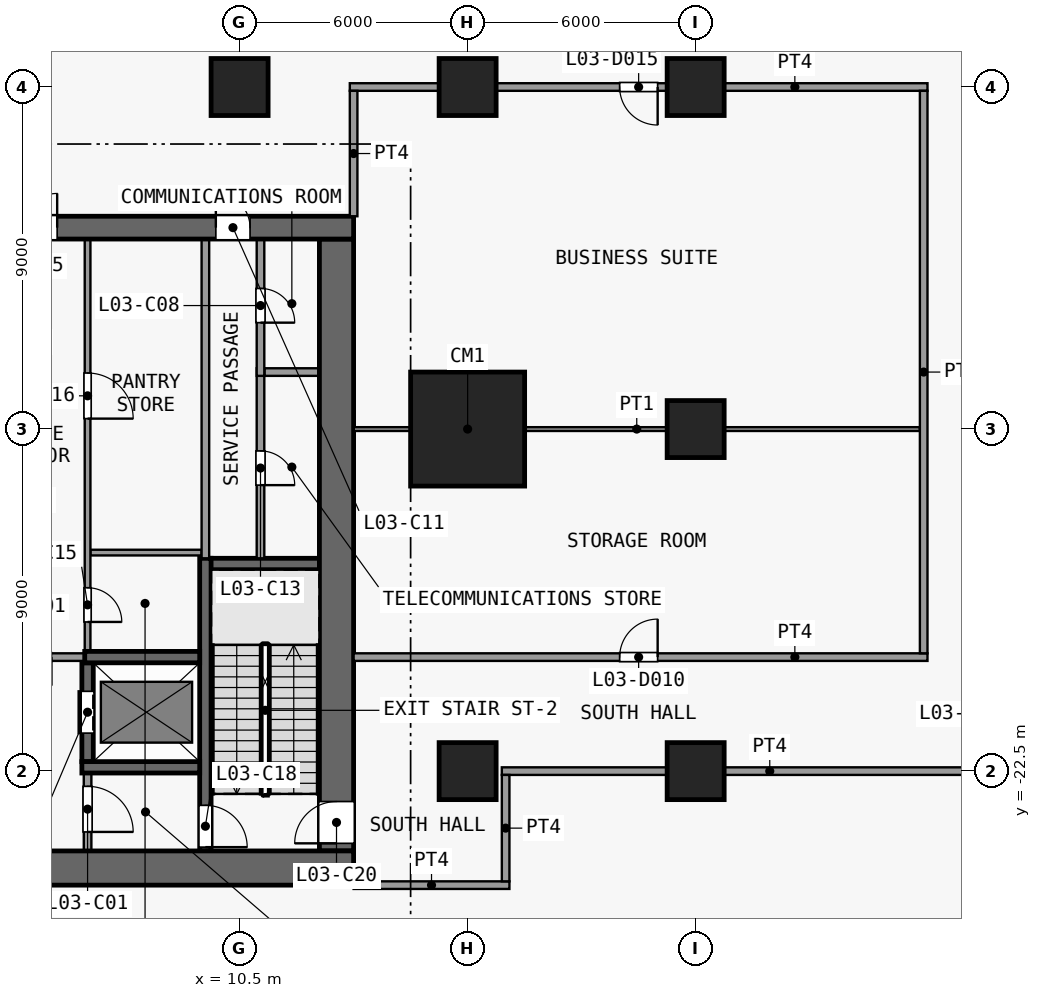
"""IFC4 building model, lengths in metres.
Left out: names, types, materials, properties, quantities, classifications, styles, units other than length and angle.
Written with IfcOpenShell. Run it as: python <this file> out.ifc"""

import sys

from ifc_helpers import new_model, si_unit, direction, frame, frame_2d, origin, origin_2d, place, context, subcontext, project, spatial, rectangle, extrude, element, fill, save


model = new_model("IFC4")
c1 = context("Model", 3, precision=1e-05, world=origin(), true_north=direction((0.0, 1.0)))
c2 = subcontext(c1, "Body", "Model", "MODEL_VIEW")
j1 = project(units=[si_unit("LENGTHUNIT", "METRE"), si_unit("PLANEANGLEUNIT", "RADIAN")], contexts=[c1])
p1 = place(None, origin())
s1 = spatial("IfcSite", under=j1, at=p1, CompositionType="ELEMENT")
p2 = place(p1, origin())
s2 = spatial("IfcBuilding", under=s1, at=p2, CompositionType="ELEMENT")
p3 = place(p2, frame((0.0, 0.0, 18.5)))
s3 = spatial("IfcBuildingStorey", under=s2, at=p3, CompositionType="ELEMENT", Elevation=18.5)
for number, where, z_axis, x_axis in (
    (1, (10.5, -4.5, 0.0), (0.0, 0.0, 1.0), (1.0, 0.0, 0.0)),
    (2, (16.5, -22.5, 0.0), (0.0, 0.0, 1.0), (1.0, 0.0, 0.0)),
):
    element("IfcColumn", number, at=place(p3, frame(where, z_axis=z_axis, x_axis=x_axis)), inside=s3, PredefinedType="COLUMN", context=c2, shape_type="SweptSolid", body=[
        extrude(rectangle(XDim=1.5, YDim=1.5, at=origin_2d()), origin(), (0.0, 0.0, 1.0), 5.0),
    ])
p4 = place(p3, frame((16.5, -13.5, 0.0), z_axis=(0.0, 0.0, 1.0), x_axis=(1.0, 0.0, 0.0)))
e3 = element("IfcColumn", 3, at=p4, inside=s3, PredefinedType="COLUMN", context=c2, shape_type="SweptSolid", body=[
    extrude(rectangle(XDim=3.0, YDim=3.0, at=origin_2d()), origin(), (0.0, 0.0, 1.0), 5.0),
])
for number, where, z_axis, x_axis in (
    (4, (16.5, -4.5, 0.0), (0.0, 0.0, 1.0), (1.0, 0.0, 0.0)),
    (5, (22.5, -22.5, 0.0), (0.0, 0.0, 1.0), (1.0, 0.0, 0.0)),
    (6, (22.5, -13.5, 0.0), (0.0, 0.0, 1.0), (1.0, 0.0, 0.0)),
    (7, (22.5, -4.5, 0.0), (0.0, 0.0, 1.0), (1.0, 0.0, 0.0)),
):
    element("IfcColumn", number, at=place(p3, frame(where, z_axis=z_axis, x_axis=x_axis)), inside=s3, PredefinedType="COLUMN", context=c2, shape_type="SweptSolid", body=[
        extrude(rectangle(XDim=1.5, YDim=1.5, at=origin_2d()), origin(), (0.0, 0.0, 1.0), 5.0),
    ])
p5 = place(p3, frame((-13.5, -25.05, 0.0), z_axis=(0.0, 0.0, 1.0), x_axis=(1.0, 0.0, 0.0)))
e8 = element("IfcWall", 8, at=p5, inside=s3, PredefinedType="SHEAR", context=c2, shape_type="SweptSolid", body=[
    extrude(rectangle(XDim=27.0, YDim=0.9, at=frame_2d((13.5, 0.0))), origin(), (0.0, 0.0, 1.0), 4.65),
])
p6 = place(p3, frame((-13.5, -8.2, 0.0), z_axis=(0.0, 0.0, 1.0), x_axis=(1.0, 0.0, 0.0)))
e9 = element("IfcWall", 9, at=p6, inside=s3, PredefinedType="SHEAR", context=c2, shape_type="SweptSolid", body=[
    extrude(rectangle(XDim=27.0, YDim=0.6, at=frame_2d((13.5, 0.0))), origin(), (0.0, 0.0, 1.0), 4.65),
])
p7 = place(p6, frame((7.8, 0.0, 0.0)))
e10 = element("IfcOpeningElement", 10, at=p7, cuts=e9, PredefinedType="OPENING", context=c2, shape_type="SweptSolid", body=[
    extrude(rectangle(XDim=1.8, YDim=2.1, at=frame_2d((0.9, 1.05))), frame((0.0, 0.31, 0.0), z_axis=(0.0, -1.0, 0.0), x_axis=(1.0, 0.0, 0.0)), (0.0, 0.0, 1.0), 0.62),
])
p8 = place(p6, frame((17.4, 0.0, 0.0)))
e11 = element("IfcOpeningElement", 11, at=p8, cuts=e9, PredefinedType="OPENING", context=c2, shape_type="SweptSolid", body=[
    extrude(rectangle(XDim=1.8, YDim=2.1, at=frame_2d((0.9, 1.05))), frame((0.0, 0.31, 0.0), z_axis=(0.0, -1.0, 0.0), x_axis=(1.0, 0.0, 0.0)), (0.0, 0.0, 1.0), 0.62),
])
p9 = place(p6, frame((2.725, 0.0, 0.0)))
e12 = element("IfcOpeningElement", 12, at=p9, cuts=e9, PredefinedType="OPENING", context=c2, shape_type="SweptSolid", body=[
    extrude(rectangle(XDim=0.9, YDim=2.1, at=frame_2d((0.45, 1.05))), frame((0.0, 0.31, 0.0), z_axis=(0.0, -1.0, 0.0), x_axis=(1.0, 0.0, 0.0)), (0.0, 0.0, 1.0), 0.62),
])
p10 = place(p6, frame((23.375, 0.0, 0.0)))
e13 = element("IfcOpeningElement", 13, at=p10, cuts=e9, PredefinedType="OPENING", context=c2, shape_type="SweptSolid", body=[
    extrude(rectangle(XDim=0.9, YDim=2.1, at=frame_2d((0.45, 1.05))), frame((0.0, 0.31, 0.0), z_axis=(0.0, -1.0, 0.0), x_axis=(1.0, 0.0, 0.0)), (0.0, 0.0, 1.0), 0.62),
])
p11 = place(p3, frame((13.05, -24.6, 0.0), z_axis=(0.0, 0.0, 1.0), x_axis=(0.0, 1.0, 0.0)))
e14 = element("IfcWall", 14, at=p11, inside=s3, PredefinedType="SHEAR", context=c2, shape_type="SweptSolid", body=[
    extrude(rectangle(XDim=16.1, YDim=0.9, at=frame_2d((8.05, 0.0))), origin(), (0.0, 0.0, 1.0), 4.65),
])
p12 = place(p11, frame((0.2, 0.0, 0.0)))
e15 = element("IfcOpeningElement", 15, at=p12, cuts=e14, PredefinedType="OPENING", context=c2, shape_type="SweptSolid", body=[
    extrude(rectangle(XDim=1.1, YDim=2.1, at=frame_2d((0.55, 1.05))), frame((0.0, 0.46, 0.0), z_axis=(0.0, -1.0, 0.0), x_axis=(1.0, 0.0, 0.0)), (0.0, 0.0, 1.0), 0.92),
])
p13 = place(p3, frame((6.35, -22.4, 0.0), z_axis=(0.0, 0.0, 1.0), x_axis=(1.0, 0.0, 0.0)))
e16 = element("IfcWall", 16, at=p13, inside=s3, PredefinedType="SHEAR", context=c2, shape_type="SweptSolid", body=[
    extrude(rectangle(XDim=3.1, YDim=0.3, at=frame_2d((1.55, 0.0))), origin(), (0.0, 0.0, 1.0), 4.65),
])
p14 = place(p3, frame((6.575, -19.5, 0.0), z_axis=(0.0, 0.0, 1.0), x_axis=(-1.0, 0.0, 0.0)))
e17 = element("IfcWall", 17, at=p14, inside=s3, PredefinedType="PARTITIONING", context=c2, shape_type="SweptSolid", body=[
    extrude(rectangle(XDim=3.375, YDim=0.2, at=frame_2d((1.688, 0.0))), origin(), (0.0, 0.0, 1.0), 4.65),
])
p15 = place(p14, frame((1.025, 0.0, 0.0)))
e18 = element("IfcOpeningElement", 18, at=p15, cuts=e17, PredefinedType="OPENING", context=c2, shape_type="SweptSolid", body=[
    extrude(rectangle(XDim=1.5, YDim=2.1, at=frame_2d((0.75, 1.05))), frame((0.0, 0.11, 0.0), z_axis=(0.0, -1.0, 0.0), x_axis=(1.0, 0.0, 0.0)), (0.0, 0.0, 1.0), 0.22),
])
p16 = place(p3, frame((6.425, -19.5, 0.0), z_axis=(0.0, 0.0, 1.0), x_axis=(1.0, 0.0, 0.0)))
e19 = element("IfcWall", 19, at=p16, inside=s3, PredefinedType="SHEAR", context=c2, shape_type="SweptSolid", body=[
    extrude(rectangle(XDim=3.025, YDim=0.3, at=frame_2d((1.512, 0.0))), origin(), (0.0, 0.0, 1.0), 4.65),
])
p17 = place(p3, frame((9.5, -17.05, 0.0), z_axis=(0.0, 0.0, 1.0), x_axis=(1.0, 0.0, 0.0)))
e20 = element("IfcWall", 20, at=p17, inside=s3, PredefinedType="SHEAR", context=c2, shape_type="SweptSolid", body=[
    extrude(rectangle(XDim=3.1, YDim=0.3, at=frame_2d((1.55, 0.0))), origin(), (0.0, 0.0, 1.0), 4.65),
])
p18 = place(p3, frame((6.575, -16.75, 0.0), z_axis=(0.0, 0.0, 1.0), x_axis=(1.0, 0.0, 0.0)))
e21 = element("IfcWall", 21, at=p18, inside=s3, PredefinedType="PARTITIONING", context=c2, shape_type="SweptSolid", body=[
    extrude(rectangle(XDim=2.925, YDim=0.15, at=frame_2d((1.462, 0.0))), origin(), (0.0, 0.0, 1.0), 4.65),
])
p19 = place(p3, frame((11.15, -12.0, 0.0), z_axis=(0.0, 0.0, 1.0), x_axis=(1.0, 0.0, 0.0)))
e22 = element("IfcWall", 22, at=p19, inside=s3, PredefinedType="PARTITIONING", context=c2, shape_type="SweptSolid", body=[
    extrude(rectangle(XDim=1.45, YDim=0.2, at=frame_2d((0.725, 0.0))), origin(), (0.0, 0.0, 1.0), 4.65),
])
p20 = place(p3, frame((6.5, -22.55, 0.0), z_axis=(0.0, 0.0, 1.0), x_axis=(0.0, -1.0, 0.0)))
e23 = element("IfcWall", 23, at=p20, inside=s3, PredefinedType="PARTITIONING", context=c2, shape_type="SweptSolid", body=[
    extrude(rectangle(XDim=2.05, YDim=0.2, at=frame_2d((1.025, 0.0))), origin(), (0.0, 0.0, 1.0), 4.65),
])
p21 = place(p20, frame((0.35, 0.0, 0.0)))
e24 = element("IfcOpeningElement", 24, at=p21, cuts=e23, PredefinedType="OPENING", context=c2, shape_type="SweptSolid", body=[
    extrude(rectangle(XDim=1.2, YDim=2.1, at=frame_2d((0.6, 1.05))), frame((0.0, 0.11, 0.0), z_axis=(0.0, -1.0, 0.0), x_axis=(1.0, 0.0, 0.0)), (0.0, 0.0, 1.0), 0.22),
])
p22 = place(p3, frame((6.5, -22.25, 0.0), z_axis=(0.0, 0.0, 1.0), x_axis=(0.0, 1.0, 0.0)))
e25 = element("IfcWall", 25, at=p22, inside=s3, PredefinedType="SHEAR", context=c2, shape_type="SweptSolid", body=[
    extrude(rectangle(XDim=2.6, YDim=0.3, at=frame_2d((1.3, 0.0))), origin(), (0.0, 0.0, 1.0), 4.65),
])
p23 = place(p22, frame((0.75, 0.0, 0.0)))
e26 = element("IfcOpeningElement", 26, at=p23, cuts=e25, PredefinedType="OPENING", context=c2, shape_type="SweptSolid", body=[
    extrude(rectangle(XDim=1.1, YDim=2.1, at=frame_2d((0.55, 1.05))), frame((0.0, 0.16, 0.0), z_axis=(0.0, -1.0, 0.0), x_axis=(1.0, 0.0, 0.0)), (0.0, 0.0, 1.0), 0.32),
])
p24 = place(p3, frame((6.5, -8.5, 0.0), z_axis=(0.0, 0.0, 1.0), x_axis=(0.0, -1.0, 0.0)))
e27 = element("IfcWall", 27, at=p24, inside=s3, PredefinedType="PARTITIONING", context=c2, shape_type="SweptSolid", body=[
    extrude(rectangle(XDim=10.85, YDim=0.15, at=frame_2d((5.425, 0.0))), origin(), (0.0, 0.0, 1.0), 4.65),
])
p25 = place(p24, frame((9.175, 0.0, 0.0)))
e28 = element("IfcOpeningElement", 28, at=p25, cuts=e27, PredefinedType="OPENING", context=c2, shape_type="SweptSolid", body=[
    extrude(rectangle(XDim=0.9, YDim=2.1, at=frame_2d((0.45, 1.05))), frame((0.0, 0.085, 0.0), z_axis=(0.0, -1.0, 0.0), x_axis=(1.0, 0.0, 0.0)), (0.0, 0.0, 1.0), 0.17),
])
p26 = place(p24, frame((3.525, 0.0, 0.0)))
e29 = element("IfcOpeningElement", 29, at=p26, cuts=e27, PredefinedType="OPENING", context=c2, shape_type="SweptSolid", body=[
    extrude(rectangle(XDim=1.2, YDim=2.1, at=frame_2d((0.6, 1.05))), frame((0.0, 0.085, 0.0), z_axis=(0.0, -1.0, 0.0), x_axis=(1.0, 0.0, 0.0)), (0.0, 0.0, 1.0), 0.17),
])
p27 = place(p3, frame((9.6, -16.9, 0.0), z_axis=(0.0, 0.0, 1.0), x_axis=(0.0, -1.0, 0.0)))
e30 = element("IfcWall", 30, at=p27, inside=s3, PredefinedType="SHEAR", context=c2, shape_type="SweptSolid", body=[
    extrude(rectangle(XDim=7.7, YDim=0.3, at=frame_2d((3.85, 0.0))), origin(), (0.0, 0.0, 1.0), 4.65),
])
p28 = place(p27, frame((6.5, 0.0, 0.0)))
e31 = element("IfcOpeningElement", 31, at=p28, cuts=e30, PredefinedType="OPENING", context=c2, shape_type="SweptSolid", body=[
    extrude(rectangle(XDim=1.1, YDim=2.1, at=frame_2d((0.55, 1.05))), frame((0.0, 0.16, 0.0), z_axis=(0.0, -1.0, 0.0), x_axis=(1.0, 0.0, 0.0)), (0.0, 0.0, 1.0), 0.32),
])
p29 = place(p3, frame((9.6, -16.9, 0.0), z_axis=(0.0, 0.0, 1.0), x_axis=(0.0, 1.0, 0.0)))
e32 = element("IfcWall", 32, at=p29, inside=s3, PredefinedType="PARTITIONING", context=c2, shape_type="SweptSolid", body=[
    extrude(rectangle(XDim=8.4, YDim=0.2, at=frame_2d((4.2, 0.0))), origin(), (0.0, 0.0, 1.0), 4.65),
])
p30 = place(p3, frame((11.05, -11.9, 0.0), z_axis=(0.0, 0.0, 1.0), x_axis=(0.0, -1.0, 0.0)))
e33 = element("IfcWall", 33, at=p30, inside=s3, PredefinedType="PARTITIONING", context=c2, shape_type="SweptSolid", body=[
    extrude(rectangle(XDim=5.0, YDim=0.2, at=frame_2d((2.5, 0.0))), origin(), (0.0, 0.0, 1.0), 4.65),
])
p31 = place(p30, frame((2.175, 0.0, 0.0)))
e34 = element("IfcOpeningElement", 34, at=p31, cuts=e33, PredefinedType="OPENING", context=c2, shape_type="SweptSolid", body=[
    extrude(rectangle(XDim=0.9, YDim=2.1, at=frame_2d((0.45, 1.05))), frame((0.0, 0.11, 0.0), z_axis=(0.0, -1.0, 0.0), x_axis=(1.0, 0.0, 0.0)), (0.0, 0.0, 1.0), 0.22),
])
p32 = place(p3, frame((11.05, -8.5, 0.0), z_axis=(0.0, 0.0, 1.0), x_axis=(0.0, -1.0, 0.0)))
e35 = element("IfcWall", 35, at=p32, inside=s3, PredefinedType="PARTITIONING", context=c2, shape_type="SweptSolid", body=[
    extrude(rectangle(XDim=3.6, YDim=0.2, at=frame_2d((1.8, 0.0))), origin(), (0.0, 0.0, 1.0), 4.65),
])
p33 = place(p32, frame((1.3, 0.0, 0.0)))
e36 = element("IfcOpeningElement", 36, at=p33, cuts=e35, PredefinedType="OPENING", context=c2, shape_type="SweptSolid", body=[
    extrude(rectangle(XDim=0.9, YDim=2.1, at=frame_2d((0.45, 1.05))), frame((0.0, 0.11, 0.0), z_axis=(0.0, -1.0, 0.0), x_axis=(1.0, 0.0, 0.0)), (0.0, 0.0, 1.0), 0.22),
])
p34 = place(p3, frame((13.5, -25.5, 0.0), z_axis=(0.0, 0.0, 1.0), x_axis=(1.0, 0.0, 0.0)))
e37 = element("IfcWall", 37, at=p34, inside=s3, PredefinedType="PARTITIONING", context=c2, shape_type="SweptSolid", body=[
    extrude(rectangle(XDim=4.1, YDim=0.2, at=frame_2d((2.05, 0.0))), origin(), (0.0, 0.0, 1.0), 4.65),
])
p35 = place(p3, frame((17.4, -22.5, 0.0), z_axis=(0.0, 0.0, 1.0), x_axis=(1.0, 0.0, 0.0)))
e38 = element("IfcWall", 38, at=p35, inside=s3, PredefinedType="PARTITIONING", context=c2, shape_type="SweptSolid", body=[
    extrude(rectangle(XDim=14.1, YDim=0.2, at=frame_2d((7.05, 0.0))), origin(), (0.0, 0.0, 1.0), 4.65),
])
p36 = place(p3, frame((13.5, -19.5, 0.0), z_axis=(0.0, 0.0, 1.0), x_axis=(1.0, 0.0, 0.0)))
e39 = element("IfcWall", 39, at=p36, inside=s3, PredefinedType="PARTITIONING", context=c2, shape_type="SweptSolid", body=[
    extrude(rectangle(XDim=15.1, YDim=0.2, at=frame_2d((7.55, 0.0))), origin(), (0.0, 0.0, 1.0), 4.65),
])
p37 = place(p36, frame((7.0, 0.0, 0.0)))
e40 = element("IfcOpeningElement", 40, at=p37, cuts=e39, PredefinedType="OPENING", context=c2, shape_type="SweptSolid", body=[
    extrude(rectangle(XDim=1.0, YDim=2.1, at=frame_2d((0.5, 1.05))), frame((0.0, 0.11, 0.0), z_axis=(0.0, -1.0, 0.0), x_axis=(1.0, 0.0, 0.0)), (0.0, 0.0, 1.0), 0.22),
])
p38 = place(p3, frame((13.5, -13.5, 0.0), z_axis=(0.0, 0.0, 1.0), x_axis=(1.0, 0.0, 0.0)))
e41 = element("IfcWall", 41, at=p38, inside=s3, PredefinedType="PARTITIONING", context=c2, shape_type="SweptSolid", body=[
    extrude(rectangle(XDim=14.9, YDim=0.1, at=frame_2d((7.45, 0.0))), origin(), (0.0, 0.0, 1.0), 4.65),
])
p39 = place(p3, frame((13.4, -4.5, 0.0), z_axis=(0.0, 0.0, 1.0), x_axis=(1.0, 0.0, 0.0)))
e42 = element("IfcWall", 42, at=p39, inside=s3, PredefinedType="PARTITIONING", context=c2, shape_type="SweptSolid", body=[
    extrude(rectangle(XDim=15.2, YDim=0.2, at=frame_2d((7.6, 0.0))), origin(), (0.0, 0.0, 1.0), 4.65),
])
p40 = place(p39, frame((7.1, 0.0, 0.0)))
e43 = element("IfcOpeningElement", 43, at=p40, cuts=e42, PredefinedType="OPENING", context=c2, shape_type="SweptSolid", body=[
    extrude(rectangle(XDim=1.0, YDim=2.1, at=frame_2d((0.5, 1.05))), frame((0.0, 0.11, 0.0), z_axis=(0.0, -1.0, 0.0), x_axis=(1.0, 0.0, 0.0)), (0.0, 0.0, 1.0), 0.22),
])
p41 = place(p3, frame((13.5, -7.9, 0.0), z_axis=(0.0, 0.0, 1.0), x_axis=(0.0, 1.0, 0.0)))
e44 = element("IfcWall", 44, at=p41, inside=s3, PredefinedType="PARTITIONING", context=c2, shape_type="SweptSolid", body=[
    extrude(rectangle(XDim=3.3, YDim=0.2, at=frame_2d((1.65, 0.0))), origin(), (0.0, 0.0, 1.0), 4.65),
])
p42 = place(p3, frame((17.5, -25.4, 0.0), z_axis=(0.0, 0.0, 1.0), x_axis=(0.0, 1.0, 0.0)))
e45 = element("IfcWall", 45, at=p42, inside=s3, PredefinedType="PARTITIONING", context=c2, shape_type="SweptSolid", body=[
    extrude(rectangle(XDim=2.8, YDim=0.2, at=frame_2d((1.4, 0.0))), origin(), (0.0, 0.0, 1.0), 4.65),
])
p43 = place(p3, frame((28.5, -19.4, 0.0), z_axis=(0.0, 0.0, 1.0), x_axis=(0.0, 1.0, 0.0)))
e46 = element("IfcWall", 46, at=p43, inside=s3, PredefinedType="PARTITIONING", context=c2, shape_type="SweptSolid", body=[
    extrude(rectangle(XDim=14.8, YDim=0.2, at=frame_2d((7.4, 0.0))), origin(), (0.0, 0.0, 1.0), 4.65),
])
p44 = place(p23, origin())
e47 = element("IfcDoor", 47, at=p44, inside=s3, OperationType="DOUBLE_DOOR_SLIDING", PredefinedType="DOOR", context=c2, shape_type="SweptSolid", body=[
    extrude(rectangle(XDim=1.1, YDim=2.1, at=frame_2d((0.55, 1.05))), frame((0.0, 0.025, 0.0), z_axis=(0.0, -1.0, 0.0), x_axis=(1.0, 0.0, 0.0)), (0.0, 0.0, 1.0), 0.05),
])
fill(e26, e47)
p45 = place(p21, origin())
e48 = element("IfcDoor", 48, at=p45, inside=s3, OperationType="SINGLE_SWING_RIGHT", PredefinedType="DOOR", context=c2, shape_type="SweptSolid", body=[
    extrude(rectangle(XDim=1.2, YDim=2.1, at=frame_2d((0.6, 1.05))), frame((0.0, 0.025, 0.0), z_axis=(0.0, -1.0, 0.0), x_axis=(1.0, 0.0, 0.0)), (0.0, 0.0, 1.0), 0.05),
])
fill(e24, e48)
p46 = place(p8, origin())
e49 = element("IfcDoor", 49, at=p46, inside=s3, OperationType="DOUBLE_DOOR_SINGLE_SWING", PredefinedType="DOOR", context=c2, shape_type="SweptSolid", body=[
    extrude(rectangle(XDim=1.8, YDim=2.1, at=frame_2d((0.9, 1.05))), frame((0.0, 0.025, 0.0), z_axis=(0.0, -1.0, 0.0), x_axis=(1.0, 0.0, 0.0)), (0.0, 0.0, 1.0), 0.05),
])
fill(e11, e49)
p47 = place(p33, origin())
e50 = element("IfcDoor", 50, at=p47, inside=s3, OperationType="SINGLE_SWING_RIGHT", PredefinedType="DOOR", context=c2, shape_type="SweptSolid", body=[
    extrude(rectangle(XDim=0.9, YDim=2.1, at=frame_2d((0.45, 1.05))), frame((0.0, 0.025, 0.0), z_axis=(0.0, -1.0, 0.0), x_axis=(1.0, 0.0, 0.0)), (0.0, 0.0, 1.0), 0.05),
])
fill(e36, e50)
p48 = place(p10, origin())
e51 = element("IfcDoor", 51, at=p48, inside=s3, OperationType="SINGLE_SWING_LEFT", PredefinedType="DOOR", context=c2, shape_type="SweptSolid", body=[
    extrude(rectangle(XDim=0.9, YDim=2.1, at=frame_2d((0.45, 1.05))), frame((0.0, 0.025, 0.0), z_axis=(0.0, -1.0, 0.0), x_axis=(1.0, 0.0, 0.0)), (0.0, 0.0, 1.0), 0.05),
])
fill(e13, e51)
p49 = place(p31, origin())
e52 = element("IfcDoor", 52, at=p49, inside=s3, OperationType="SINGLE_SWING_RIGHT", PredefinedType="DOOR", context=c2, shape_type="SweptSolid", body=[
    extrude(rectangle(XDim=0.9, YDim=2.1, at=frame_2d((0.45, 1.05))), frame((0.0, 0.025, 0.0), z_axis=(0.0, -1.0, 0.0), x_axis=(1.0, 0.0, 0.0)), (0.0, 0.0, 1.0), 0.05),
])
fill(e34, e52)
p50 = place(p25, origin())
e53 = element("IfcDoor", 53, at=p50, inside=s3, OperationType="SINGLE_SWING_RIGHT", PredefinedType="DOOR", context=c2, shape_type="SweptSolid", body=[
    extrude(rectangle(XDim=0.9, YDim=2.1, at=frame_2d((0.45, 1.05))), frame((0.0, 0.025, 0.0), z_axis=(0.0, -1.0, 0.0), x_axis=(1.0, 0.0, 0.0)), (0.0, 0.0, 1.0), 0.05),
])
fill(e28, e53)
p51 = place(p26, origin())
e54 = element("IfcDoor", 54, at=p51, inside=s3, OperationType="SINGLE_SWING_RIGHT", PredefinedType="DOOR", context=c2, shape_type="SweptSolid", body=[
    extrude(rectangle(XDim=1.2, YDim=2.1, at=frame_2d((0.6, 1.05))), frame((0.0, 0.025, 0.0), z_axis=(0.0, -1.0, 0.0), x_axis=(1.0, 0.0, 0.0)), (0.0, 0.0, 1.0), 0.05),
])
fill(e29, e54)
p52 = place(p28, origin())
e55 = element("IfcDoor", 55, at=p52, inside=s3, OperationType="SINGLE_SWING_RIGHT", PredefinedType="DOOR", context=c2, shape_type="SweptSolid", body=[
    extrude(rectangle(XDim=1.1, YDim=2.1, at=frame_2d((0.55, 1.05))), frame((0.0, 0.025, 0.0), z_axis=(0.0, -1.0, 0.0), x_axis=(1.0, 0.0, 0.0)), (0.0, 0.0, 1.0), 0.05),
])
fill(e31, e55)
p53 = place(p12, origin())
e56 = element("IfcDoor", 56, at=p53, inside=s3, OperationType="SINGLE_SWING_LEFT", PredefinedType="DOOR", context=c2, shape_type="SweptSolid", body=[
    extrude(rectangle(XDim=1.1, YDim=2.1, at=frame_2d((0.55, 1.05))), frame((0.0, 0.025, 0.0), z_axis=(0.0, -1.0, 0.0), x_axis=(1.0, 0.0, 0.0)), (0.0, 0.0, 1.0), 0.05),
])
fill(e15, e56)
p54 = place(p37, origin())
e57 = element("IfcDoor", 57, at=p54, inside=s3, OperationType="SINGLE_SWING_LEFT", PredefinedType="DOOR", context=c2, shape_type="SweptSolid", body=[
    extrude(rectangle(XDim=1.0, YDim=2.1, at=frame_2d((0.5, 1.05))), frame((0.0, 0.025, 0.0), z_axis=(0.0, -1.0, 0.0), x_axis=(1.0, 0.0, 0.0)), (0.0, 0.0, 1.0), 0.05),
])
fill(e40, e57)
p55 = place(p40, origin())
e58 = element("IfcDoor", 58, at=p55, inside=s3, OperationType="SINGLE_SWING_RIGHT", PredefinedType="DOOR", context=c2, shape_type="SweptSolid", body=[
    extrude(rectangle(XDim=1.0, YDim=2.1, at=frame_2d((0.5, 1.05))), frame((0.0, 0.025, 0.0), z_axis=(0.0, -1.0, 0.0), x_axis=(1.0, 0.0, 0.0)), (0.0, 0.0, 1.0), 0.05),
])
fill(e43, e58)
save(model, sys.argv[1])
